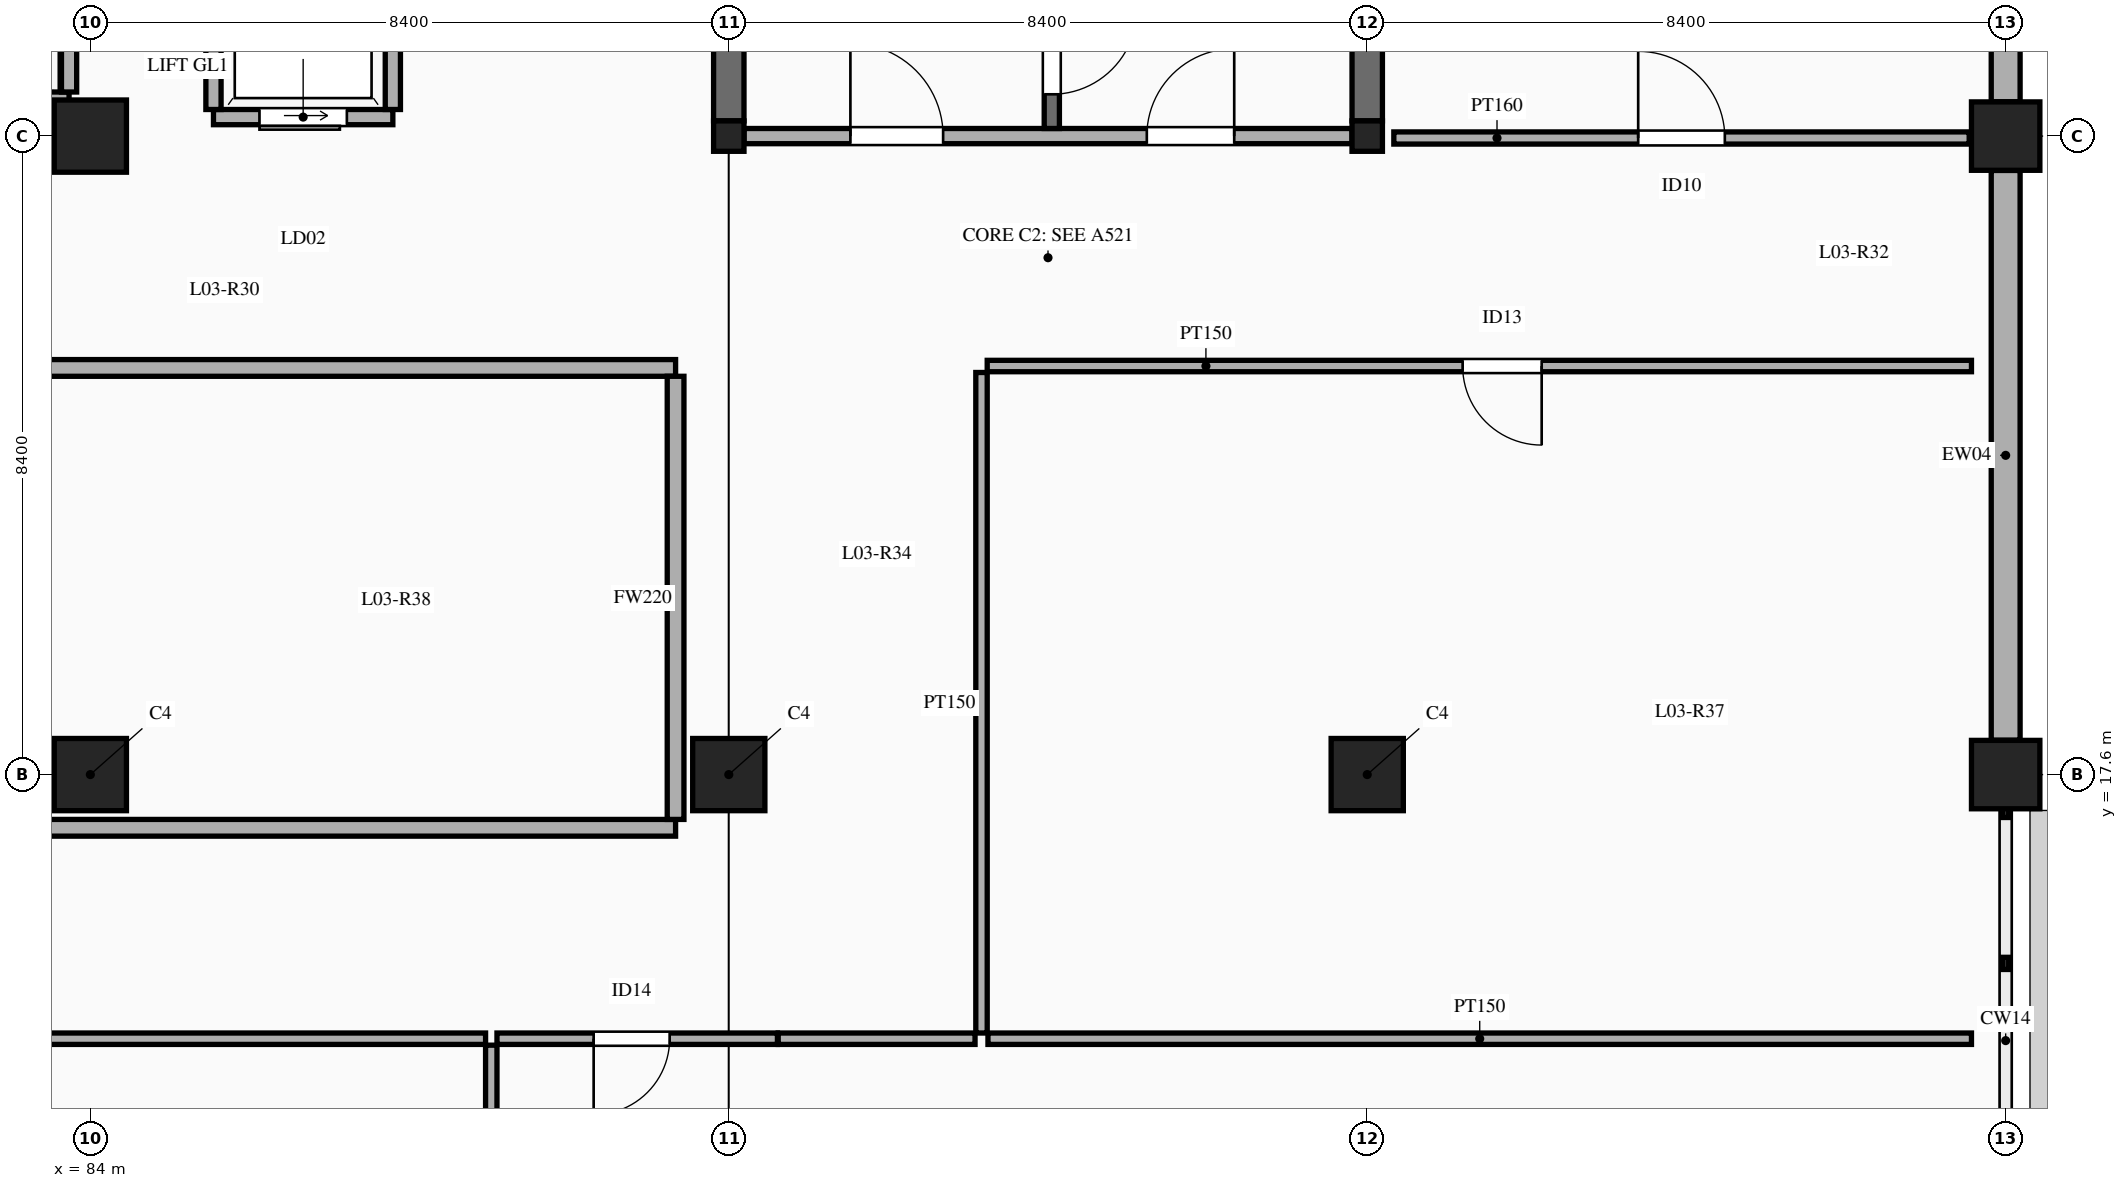
"""IFC4 building model, lengths in metres.
Left out: names, types, materials, properties, quantities, classifications, styles, units other than length and angle.
Written with IfcOpenShell. Run it as: python <this file> out.ifc"""

import sys

from ifc_helpers import new_model, si_unit, direction, frame, frame_2d, origin, origin_2d, place, context, subcontext, project, spatial, rectangle, extrude, element, fill, save


model = new_model("IFC4")
c1 = context("Model", 3, precision=1e-05, world=origin(), true_north=direction((0.0, 1.0)))
c2 = subcontext(c1, "Body", "Model", "MODEL_VIEW")
j1 = project(units=[si_unit("LENGTHUNIT", "METRE"), si_unit("PLANEANGLEUNIT", "RADIAN")], contexts=[c1])
p1 = place(None, origin())
s1 = spatial("IfcSite", under=j1, at=p1, CompositionType="ELEMENT")
p2 = place(p1, origin())
s2 = spatial("IfcBuilding", under=s1, at=p2, CompositionType="ELEMENT")
p3 = place(p2, frame((0.0, 0.0, 15.0)))
s3 = spatial("IfcBuildingStorey", under=s2, at=p3, CompositionType="ELEMENT", Elevation=15.0)
for number, where, z_axis, x_axis in (
    (1, (84.0, 17.6, 0.0), (0.0, 0.0, 1.0), (1.0, 0.0, 0.0)),
    (2, (84.0, 26.0, 0.0), (0.0, 0.0, 1.0), (1.0, 0.0, 0.0)),
    (3, (92.4, 17.6, 0.0), (0.0, 0.0, 1.0), (1.0, 0.0, 0.0)),
):
    element("IfcColumn", number, at=place(p3, frame(where, z_axis=z_axis, x_axis=x_axis)), inside=s3, PredefinedType="COLUMN", context=c2, shape_type="SweptSolid", body=[
        extrude(rectangle(XDim=0.95, YDim=0.95, at=origin_2d()), origin(), (0.0, 0.0, 1.0), 4.5),
    ])
p4 = place(p3, frame((92.4, 26.0, 0.0), z_axis=(0.0, 0.0, 1.0), x_axis=(1.0, 0.0, 0.0)))
e4 = element("IfcColumn", 4, at=p4, inside=s3, PredefinedType="COLUMN", context=c2, shape_type="SweptSolid", body=[
    extrude(rectangle(XDim=0.4, YDim=0.4, at=origin_2d()), origin(), (0.0, 0.0, 1.0), 4.5),
])
p5 = place(p3, frame((100.8, 17.6, 0.0), z_axis=(0.0, 0.0, 1.0), x_axis=(1.0, 0.0, 0.0)))
e5 = element("IfcColumn", 5, at=p5, inside=s3, PredefinedType="COLUMN", context=c2, shape_type="SweptSolid", body=[
    extrude(rectangle(XDim=0.95, YDim=0.95, at=origin_2d()), origin(), (0.0, 0.0, 1.0), 4.5),
])
p6 = place(p3, frame((100.8, 26.0, 0.0), z_axis=(0.0, 0.0, 1.0), x_axis=(1.0, 0.0, 0.0)))
e6 = element("IfcColumn", 6, at=p6, inside=s3, PredefinedType="COLUMN", context=c2, shape_type="SweptSolid", body=[
    extrude(rectangle(XDim=0.4, YDim=0.4, at=origin_2d()), origin(), (0.0, 0.0, 1.0), 4.5),
])
for number, where, z_axis, x_axis in (
    (7, (109.2, 17.6, 0.0), (0.0, 0.0, 1.0), (1.0, 0.0, 0.0)),
    (8, (109.2, 26.0, 0.0), (0.0, 0.0, 1.0), (1.0, 0.0, 0.0)),
):
    element("IfcColumn", number, at=place(p3, frame(where, z_axis=z_axis, x_axis=x_axis)), inside=s3, PredefinedType="COLUMN", context=c2, shape_type="SweptSolid", body=[
        extrude(rectangle(XDim=0.9, YDim=0.9, at=origin_2d()), origin(), (0.0, 0.0, 1.0), 4.5),
    ])
for number, where, z_axis, x_axis in (
    (9, (92.4, 26.2, 0.0), (0.0, 0.0, 1.0), (0.0, 1.0, 0.0)),
    (10, (100.8, 26.2, 0.0), (0.0, 0.0, 1.0), (0.0, 1.0, 0.0)),
):
    element("IfcWall", number, at=place(p3, frame(where, z_axis=z_axis, x_axis=x_axis)), inside=s3, PredefinedType="SHEAR", context=c2, shape_type="SweptSolid", body=[
        extrude(rectangle(XDim=8.0, YDim=0.4, at=frame_2d((4.0, 0.0))), origin(), (0.0, 0.0, 1.0), 4.5),
    ])
for number, where, z_axis, x_axis in (
    (11, (109.2, 18.052, 0.0), (0.0, 0.0, 1.0), (0.0, 1.0, 0.0)),
    (12, (109.2, 26.452, 0.0), (0.0, 0.0, 1.0), (0.0, 1.0, 0.0)),
):
    element("IfcWall", number, at=place(p3, frame(where, z_axis=z_axis, x_axis=x_axis)), inside=s3, PredefinedType="SOLIDWALL", context=c2, shape_type="SweptSolid", body=[
        extrude(rectangle(XDim=7.496, YDim=0.38, at=frame_2d((3.748, 0.0))), origin(), (0.0, 0.0, 1.0), 3.55),
    ])
p7 = place(p3, frame((92.6, 26.0, 0.0), z_axis=(0.0, 0.0, 1.0), x_axis=(1.0, 0.0, 0.0)))
e13 = element("IfcWall", 13, at=p7, inside=s3, PredefinedType="SOLIDWALL", context=c2, shape_type="SweptSolid", body=[
    extrude(rectangle(XDim=8.0, YDim=0.2, at=frame_2d((4.0, 0.0))), origin(), (0.0, 0.0, 1.0), 3.48),
])
p8 = place(p7, frame((1.4, 0.0, 0.0)))
e14 = element("IfcOpeningElement", 14, at=p8, cuts=e13, PredefinedType="OPENING", context=c2, shape_type="SweptSolid", body=[
    extrude(rectangle(XDim=1.22, YDim=2.15, at=frame_2d((0.61, 1.075))), frame((0.0, 0.11, 0.0), z_axis=(0.0, -1.0, 0.0), x_axis=(1.0, 0.0, 0.0)), (0.0, 0.0, 1.0), 0.22),
])
p9 = place(p7, frame((5.3, 0.0, 0.0)))
e15 = element("IfcOpeningElement", 15, at=p9, cuts=e13, PredefinedType="OPENING", context=c2, shape_type="SweptSolid", body=[
    extrude(rectangle(XDim=1.15, YDim=2.15, at=frame_2d((0.575, 1.075))), frame((0.0, 0.11, 0.0), z_axis=(0.0, -1.0, 0.0), x_axis=(1.0, 0.0, 0.0)), (0.0, 0.0, 1.0), 0.22),
])
p10 = place(p3, frame((96.65, 26.1, 0.0), z_axis=(0.0, 0.0, 1.0), x_axis=(0.0, 1.0, 0.0)))
e16 = element("IfcWall", 16, at=p10, inside=s3, PredefinedType="SOLIDWALL", context=c2, shape_type="SweptSolid", body=[
    extrude(rectangle(XDim=8.1, YDim=0.2, at=frame_2d((4.05, 0.0))), origin(), (0.0, 0.0, 1.0), 4.25),
])
p11 = place(p10, frame((0.45, 0.0, 0.0)))
e17 = element("IfcOpeningElement", 17, at=p11, cuts=e16, PredefinedType="OPENING", context=c2, shape_type="SweptSolid", body=[
    extrude(rectangle(XDim=1.12, YDim=2.15, at=frame_2d((0.56, 1.075))), frame((0.0, 0.11, 0.0), z_axis=(0.0, -1.0, 0.0), x_axis=(1.0, 0.0, 0.0)), (0.0, 0.0, 1.0), 0.22),
])
p12 = place(p3, frame((75.95, 26.48, 0.0), z_axis=(0.0, 0.0, 1.0), x_axis=(1.0, 0.0, 0.0)))
e18 = element("IfcWall", 18, at=p12, inside=s3, PredefinedType="SOLIDWALL", context=c2, shape_type="SweptSolid", body=[
    extrude(rectangle(XDim=7.77, YDim=0.2, at=frame_2d((3.885, 0.0))), origin(), (0.0, 0.0, 1.0), 3.48),
])
p13 = place(p12, frame((0.55, 0.0, 0.0)))
e19 = element("IfcOpeningElement", 19, at=p13, cuts=e18, PredefinedType="OPENING", context=c2, shape_type="SweptSolid", body=[
    extrude(rectangle(XDim=1.0, YDim=2.15, at=frame_2d((0.5, 1.075))), frame((0.0, 0.11, 0.0), z_axis=(0.0, -1.0, 0.0), x_axis=(1.0, 0.0, 0.0)), (0.0, 0.0, 1.0), 0.22),
])
p14 = place(p12, frame((3.35, 0.0, 0.0)))
e20 = element("IfcOpeningElement", 20, at=p14, cuts=e18, PredefinedType="OPENING", context=c2, shape_type="SweptSolid", body=[
    extrude(rectangle(XDim=1.0, YDim=2.15, at=frame_2d((0.5, 1.075))), frame((0.0, 0.11, 0.0), z_axis=(0.0, -1.0, 0.0), x_axis=(1.0, 0.0, 0.0)), (0.0, 0.0, 1.0), 0.22),
])
p15 = place(p12, frame((6.15, 0.0, 0.0)))
e21 = element("IfcOpeningElement", 21, at=p15, cuts=e18, PredefinedType="OPENING", context=c2, shape_type="SweptSolid", body=[
    extrude(rectangle(XDim=1.0, YDim=2.15, at=frame_2d((0.5, 1.075))), frame((0.0, 0.11, 0.0), z_axis=(0.0, -1.0, 0.0), x_axis=(1.0, 0.0, 0.0)), (0.0, 0.0, 1.0), 0.22),
])
p16 = place(p3, frame((83.72, 26.58, 0.0), z_axis=(0.0, 0.0, 1.0), x_axis=(0.0, 1.0, 0.0)))
e22 = element("IfcWall", 22, at=p16, inside=s3, PredefinedType="SOLIDWALL", context=c2, shape_type="SweptSolid", body=[
    extrude(rectangle(XDim=1.84, YDim=0.2, at=frame_2d((0.92, 0.0))), origin(), (0.0, 0.0, 1.0), 3.63),
])
p17 = place(p3, frame((85.62, 26.25, 0.0), z_axis=(0.0, 0.0, 1.0), x_axis=(1.0, 0.0, 0.0)))
e23 = element("IfcWall", 23, at=p17, inside=s3, PredefinedType="SOLIDWALL", context=c2, shape_type="SweptSolid", body=[
    extrude(rectangle(XDim=2.36, YDim=0.2, at=frame_2d((1.18, 0.0))), origin(), (0.0, 0.0, 1.0), 3.48),
])
p18 = place(p17, frame((0.605, 0.0, 0.0)))
e24 = element("IfcOpeningElement", 24, at=p18, cuts=e23, PredefinedType="OPENING", context=c2, shape_type="SweptSolid", body=[
    extrude(rectangle(XDim=1.15, YDim=2.2, at=frame_2d((0.575, 1.1))), frame((0.0, 0.11, 0.0), z_axis=(0.0, -1.0, 0.0), x_axis=(1.0, 0.0, 0.0)), (0.0, 0.0, 1.0), 0.22),
])
p19 = place(p3, frame((85.62, 26.35, 0.0), z_axis=(0.0, 0.0, 1.0), x_axis=(0.0, 1.0, 0.0)))
e25 = element("IfcWall", 25, at=p19, inside=s3, PredefinedType="SOLIDWALL", context=c2, shape_type="SweptSolid", body=[
    extrude(rectangle(XDim=2.9, YDim=0.2, at=frame_2d((1.45, 0.0))), origin(), (0.0, 0.0, 1.0), 4.25),
])
p20 = place(p3, frame((87.98, 26.35, 0.0), z_axis=(0.0, 0.0, 1.0), x_axis=(0.0, 1.0, 0.0)))
e26 = element("IfcWall", 26, at=p20, inside=s3, PredefinedType="SOLIDWALL", context=c2, shape_type="SweptSolid", body=[
    extrude(rectangle(XDim=2.9, YDim=0.2, at=frame_2d((1.45, 0.0))), origin(), (0.0, 0.0, 1.0), 3.83),
])
p21 = place(p3, frame((59.5, 22.95, 0.0), z_axis=(0.0, 0.0, 1.0), x_axis=(1.0, 0.0, 0.0)))
e27 = element("IfcWall", 27, at=p21, inside=s3, PredefinedType="SOLIDWALL", context=c2, shape_type="SweptSolid", body=[
    extrude(rectangle(XDim=32.2, YDim=0.22, at=frame_2d((16.1, 0.0))), origin(), (0.0, 0.0, 1.0), 3.45),
])
p22 = place(p21, frame((3.0, 0.0, 0.0)))
e28 = element("IfcOpeningElement", 28, at=p22, cuts=e27, PredefinedType="OPENING", context=c2, shape_type="SweptSolid", body=[
    extrude(rectangle(XDim=1.2, YDim=2.2, at=frame_2d((0.6, 1.1))), frame((0.0, 0.12, 0.0), z_axis=(0.0, -1.0, 0.0), x_axis=(1.0, 0.0, 0.0)), (0.0, 0.0, 1.0), 0.24),
])
p23 = place(p3, frame((59.5, 16.9, 0.0), z_axis=(0.0, 0.0, 1.0), x_axis=(1.0, 0.0, 0.0)))
e29 = element("IfcWall", 29, at=p23, inside=s3, PredefinedType="SOLIDWALL", context=c2, shape_type="SweptSolid", body=[
    extrude(rectangle(XDim=32.2, YDim=0.22, at=frame_2d((16.1, 0.0))), origin(), (0.0, 0.0, 1.0), 3.45),
])
p24 = place(p23, frame((19.7, 0.0, 0.0)))
e30 = element("IfcOpeningElement", 30, at=p24, cuts=e29, PredefinedType="OPENING", context=c2, shape_type="SweptSolid", body=[
    extrude(rectangle(XDim=1.05, YDim=2.15, at=frame_2d((0.525, 1.075))), frame((0.0, 0.12, 0.0), z_axis=(0.0, -1.0, 0.0), x_axis=(1.0, 0.0, 0.0)), (0.0, 0.0, 1.0), 0.24),
])
p25 = place(p3, frame((91.7, 17.01, 0.0), z_axis=(0.0, 0.0, 1.0), x_axis=(0.0, 1.0, 0.0)))
e31 = element("IfcWall", 31, at=p25, inside=s3, PredefinedType="SOLIDWALL", context=c2, shape_type="SweptSolid", body=[
    extrude(rectangle(XDim=5.83, YDim=0.22, at=frame_2d((2.915, 0.0))), origin(), (0.0, 0.0, 1.0), 3.45),
])
p26 = place(p3, frame((101.15, 25.975, 0.0), z_axis=(0.0, 0.0, 1.0), x_axis=(1.0, 0.0, 0.0)))
e32 = element("IfcWall", 32, at=p26, inside=s3, PredefinedType="PARTITIONING", context=c2, shape_type="SweptSolid", body=[
    extrude(rectangle(XDim=7.57, YDim=0.16, at=frame_2d((3.785, 0.0))), origin(), (0.0, 0.0, 1.0), 3.45),
])
p27 = place(p26, frame((3.215, 0.0, 0.0)))
e33 = element("IfcOpeningElement", 33, at=p27, cuts=e32, PredefinedType="OPENING", context=c2, shape_type="SweptSolid", body=[
    extrude(rectangle(XDim=1.14, YDim=2.22, at=frame_2d((0.57, 1.11))), frame((0.0, 0.09, 0.0), z_axis=(0.0, -1.0, 0.0), x_axis=(1.0, 0.0, 0.0)), (0.0, 0.0, 1.0), 0.18),
])
p28 = place(p3, frame((95.8, 22.975, 0.0), z_axis=(0.0, 0.0, 1.0), x_axis=(1.0, 0.0, 0.0)))
e34 = element("IfcWall", 34, at=p28, inside=s3, PredefinedType="PARTITIONING", context=c2, shape_type="SweptSolid", body=[
    extrude(rectangle(XDim=12.95, YDim=0.15, at=frame_2d((6.475, 0.0))), origin(), (0.0, 0.0, 1.0), 3.45),
])
p29 = place(p28, frame((6.255, 0.0, 0.0)))
e35 = element("IfcOpeningElement", 35, at=p29, cuts=e34, PredefinedType="OPENING", context=c2, shape_type="SweptSolid", body=[
    extrude(rectangle(XDim=1.04, YDim=2.15, at=frame_2d((0.52, 1.075))), frame((0.0, 0.085, 0.0), z_axis=(0.0, -1.0, 0.0), x_axis=(1.0, 0.0, 0.0)), (0.0, 0.0, 1.0), 0.17),
])
p30 = place(p3, frame((95.725, 14.2, 0.0), z_axis=(0.0, 0.0, 1.0), x_axis=(0.0, 1.0, 0.0)))
e36 = element("IfcWall", 36, at=p30, inside=s3, PredefinedType="PARTITIONING", context=c2, shape_type="SweptSolid", body=[
    extrude(rectangle(XDim=8.69, YDim=0.15, at=frame_2d((4.345, 0.0))), origin(), (0.0, 0.0, 1.0), 3.45),
])
p31 = place(p3, frame((93.05, 14.125, 0.0), z_axis=(0.0, 0.0, 1.0), x_axis=(1.0, 0.0, 0.0)))
e37 = element("IfcWall", 37, at=p31, inside=s3, PredefinedType="PARTITIONING", context=c2, shape_type="SweptSolid", body=[
    extrude(rectangle(XDim=2.59, YDim=0.15, at=frame_2d((1.295, 0.0))), origin(), (0.0, 0.0, 1.0), 3.45),
])
p32 = place(p3, frame((69.75, 14.125, 0.0), z_axis=(0.0, 0.0, 1.0), x_axis=(1.0, 0.0, 0.0)))
e38 = element("IfcWall", 38, at=p32, inside=s3, PredefinedType="PARTITIONING", context=c2, shape_type="SweptSolid", body=[
    extrude(rectangle(XDim=19.45, YDim=0.15, at=frame_2d((9.725, 0.0))), origin(), (0.0, 0.0, 1.0), 3.45),
])
p33 = place(p32, frame((9.13, 0.0, 0.0)))
e39 = element("IfcOpeningElement", 39, at=p33, cuts=e38, PredefinedType="OPENING", context=c2, shape_type="SweptSolid", body=[
    extrude(rectangle(XDim=1.04, YDim=2.15, at=frame_2d((0.52, 1.075))), frame((0.0, 0.085, 0.0), z_axis=(0.0, -1.0, 0.0), x_axis=(1.0, 0.0, 0.0)), (0.0, 0.0, 1.0), 0.17),
])
p34 = place(p3, frame((89.35, 14.125, 0.0), z_axis=(0.0, 0.0, 1.0), x_axis=(1.0, 0.0, 0.0)))
e40 = element("IfcWall", 40, at=p34, inside=s3, PredefinedType="PARTITIONING", context=c2, shape_type="SweptSolid", body=[
    extrude(rectangle(XDim=3.69, YDim=0.15, at=frame_2d((1.845, 0.0))), origin(), (0.0, 0.0, 1.0), 3.45),
])
p35 = place(p34, frame((1.272, 0.0, 0.0)))
e41 = element("IfcOpeningElement", 41, at=p35, cuts=e40, PredefinedType="OPENING", context=c2, shape_type="SweptSolid", body=[
    extrude(rectangle(XDim=1.0, YDim=2.15, at=frame_2d((0.5, 1.075))), frame((0.0, 0.085, 0.0), z_axis=(0.0, -1.0, 0.0), x_axis=(1.0, 0.0, 0.0)), (0.0, 0.0, 1.0), 0.17),
])
p36 = place(p3, frame((95.81, 14.125, 0.0), z_axis=(0.0, 0.0, 1.0), x_axis=(1.0, 0.0, 0.0)))
e42 = element("IfcWall", 42, at=p36, inside=s3, PredefinedType="PARTITIONING", context=c2, shape_type="SweptSolid", body=[
    extrude(rectangle(XDim=12.94, YDim=0.15, at=frame_2d((6.47, 0.0))), origin(), (0.0, 0.0, 1.0), 3.45),
])
p37 = place(p3, frame((89.275, 9.65, 0.0), z_axis=(0.0, 0.0, 1.0), x_axis=(0.0, 1.0, 0.0)))
e43 = element("IfcWall", 43, at=p37, inside=s3, PredefinedType="PARTITIONING", context=c2, shape_type="SweptSolid", body=[
    extrude(rectangle(XDim=4.39, YDim=0.15, at=frame_2d((2.195, 0.0))), origin(), (0.0, 0.0, 1.0), 3.45),
])
p38 = place(p8, origin())
e44 = element("IfcDoor", 44, at=p38, inside=s3, OperationType="SINGLE_SWING_LEFT", PredefinedType="DOOR", context=c2, shape_type="SweptSolid", body=[
    extrude(rectangle(XDim=1.22, YDim=2.15, at=frame_2d((0.61, 1.075))), frame((0.0, 0.025, 0.0), z_axis=(0.0, -1.0, 0.0), x_axis=(1.0, 0.0, 0.0)), (0.0, 0.0, 1.0), 0.05),
])
fill(e14, e44)
p39 = place(p9, origin())
e45 = element("IfcDoor", 45, at=p39, inside=s3, OperationType="SINGLE_SWING_RIGHT", PredefinedType="DOOR", context=c2, shape_type="SweptSolid", body=[
    extrude(rectangle(XDim=1.15, YDim=2.15, at=frame_2d((0.575, 1.075))), frame((0.0, 0.025, 0.0), z_axis=(0.0, -1.0, 0.0), x_axis=(1.0, 0.0, 0.0)), (0.0, 0.0, 1.0), 0.05),
])
fill(e15, e45)
p40 = place(p11, frame((1.12, 0.0, 0.0), z_axis=(0.0, 0.0, 1.0), x_axis=(-1.0, 0.0, 0.0)))
e46 = element("IfcDoor", 46, at=p40, inside=s3, OperationType="SINGLE_SWING_LEFT", PredefinedType="DOOR", context=c2, shape_type="SweptSolid", body=[
    extrude(rectangle(XDim=1.12, YDim=2.15, at=frame_2d((0.56, 1.075))), frame((0.0, 0.025, 0.0), z_axis=(0.0, -1.0, 0.0), x_axis=(1.0, 0.0, 0.0)), (0.0, 0.0, 1.0), 0.05),
])
fill(e17, e46)
p41 = place(p18, frame((1.15, 0.0, 0.0), z_axis=(0.0, 0.0, 1.0), x_axis=(-1.0, 0.0, 0.0)))
e47 = element("IfcDoor", 47, at=p41, inside=s3, OperationType="SLIDING_TO_LEFT", PredefinedType="DOOR", context=c2, shape_type="SweptSolid", body=[
    extrude(rectangle(XDim=1.15, YDim=2.2, at=frame_2d((0.575, 1.1))), frame((0.0, 0.025, 0.0), z_axis=(0.0, -1.0, 0.0), x_axis=(1.0, 0.0, 0.0)), (0.0, 0.0, 1.0), 0.05),
])
fill(e24, e47)
p42 = place(p27, origin())
e48 = element("IfcDoor", 48, at=p42, inside=s3, OperationType="SINGLE_SWING_LEFT", PredefinedType="DOOR", context=c2, shape_type="SweptSolid", body=[
    extrude(rectangle(XDim=1.14, YDim=2.22, at=frame_2d((0.57, 1.11))), frame((0.0, 0.025, 0.0), z_axis=(0.0, -1.0, 0.0), x_axis=(1.0, 0.0, 0.0)), (0.0, 0.0, 1.0), 0.05),
])
fill(e33, e48)
p43 = place(p29, frame((1.04, 0.0, 0.0), z_axis=(0.0, 0.0, 1.0), x_axis=(-1.0, 0.0, 0.0)))
e49 = element("IfcDoor", 49, at=p43, inside=s3, OperationType="SINGLE_SWING_LEFT", PredefinedType="DOOR", context=c2, shape_type="SweptSolid", body=[
    extrude(rectangle(XDim=1.04, YDim=2.15, at=frame_2d((0.52, 1.075))), frame((0.0, 0.025, 0.0), z_axis=(0.0, -1.0, 0.0), x_axis=(1.0, 0.0, 0.0)), (0.0, 0.0, 1.0), 0.05),
])
fill(e35, e49)
p44 = place(p35, frame((1.0, 0.0, 0.0), z_axis=(0.0, 0.0, 1.0), x_axis=(-1.0, 0.0, 0.0)))
e50 = element("IfcDoor", 50, at=p44, inside=s3, OperationType="SINGLE_SWING_RIGHT", PredefinedType="DOOR", context=c2, shape_type="SweptSolid", body=[
    extrude(rectangle(XDim=1.0, YDim=2.15, at=frame_2d((0.5, 1.075))), frame((0.0, 0.025, 0.0), z_axis=(0.0, -1.0, 0.0), x_axis=(1.0, 0.0, 0.0)), (0.0, 0.0, 1.0), 0.05),
])
fill(e41, e50)
save(model, sys.argv[1])
